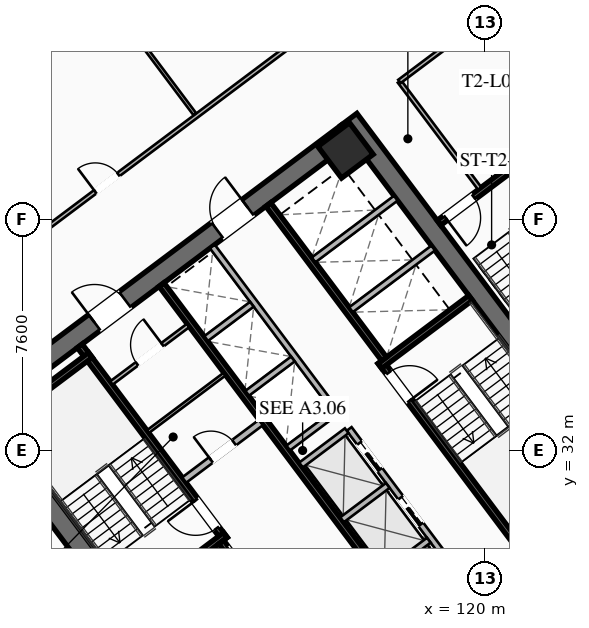
"""IFC4 building model, lengths in metres.
Left out: names, types, materials, properties, quantities, classifications, styles, units other than length and angle.
Written with IfcOpenShell. Run it as: python <this file> out.ifc"""

import sys

from ifc_helpers import new_model, si_unit, direction, frame, frame_2d, origin, origin_2d, place, context, subcontext, project, spatial, rectangle, hollow_rectangle, extrude, element, fill, save


model = new_model("IFC4")
c1 = context("Model", 3, precision=1e-05, world=origin(), true_north=direction((0.0, 1.0)))
c2 = subcontext(c1, "Body", "Model", "MODEL_VIEW")
j1 = project(units=[si_unit("LENGTHUNIT", "METRE"), si_unit("PLANEANGLEUNIT", "RADIAN")], contexts=[c1])
p1 = place(None, origin())
s1 = spatial("IfcSite", under=j1, at=p1, CompositionType="ELEMENT")
p2 = place(p1, origin())
s2 = spatial("IfcBuilding", under=s1, at=p2, CompositionType="ELEMENT")
p3 = place(p2, frame((0.0, 0.0, 28.15)))
s3 = spatial("IfcBuildingStorey", under=s2, at=p3, CompositionType="ELEMENT", Elevation=28.15)
for number, where, z_axis, x_axis in (
    (1, (112.476, 21.107, 0.0), (0.0, 0.0, 1.0), (-0.6, 0.8, 0.0)),
    (2, (115.524, 42.893, 0.0), (0.0, 0.0, 1.0), (0.6, -0.8, 0.0)),
):
    element("IfcWall", number, at=place(p3, frame(where, z_axis=z_axis, x_axis=x_axis)), inside=s3, PredefinedType="SHEAR", context=c2, shape_type="SweptSolid", body=[
        extrude(rectangle(XDim=15.6, YDim=0.65, at=frame_2d((7.8, 0.0))), origin(), (0.0, 0.0, 1.0), 3.55),
    ])
p4 = place(p3, frame((124.429, 30.478, 0.0), z_axis=(0.0, 0.0, 1.0), x_axis=(-0.799998028465, -0.600002628705, 0.0)))
e3 = element("IfcWall", 3, at=p4, inside=s3, PredefinedType="SHEAR", context=c2, shape_type="SweptSolid", body=[
    extrude(rectangle(XDim=14.86, YDim=0.65, at=frame_2d((7.43, 0.0))), origin(), (0.0, 0.0, 1.0), 3.55),
])
p5 = place(p4, frame((9.13, 0.0, 0.0)))
e4 = element("IfcOpeningElement", 4, at=p5, cuts=e3, PredefinedType="OPENING", context=c2, shape_type="SweptSolid", body=[
    extrude(rectangle(XDim=1.25, YDim=2.25, at=frame_2d((0.625, 1.125))), frame((0.0, 0.335, 0.0), z_axis=(0.0, -1.0, 0.0), x_axis=(1.0, 0.0, 0.0)), (0.0, 0.0, 1.0), 0.67),
])
p6 = place(p4, frame((4.08, 0.0, 0.0)))
e5 = element("IfcOpeningElement", 5, at=p6, cuts=e3, PredefinedType="OPENING", context=c2, shape_type="SweptSolid", body=[
    extrude(rectangle(XDim=1.25, YDim=2.25, at=frame_2d((0.625, 1.125))), frame((0.0, 0.335, 0.0), z_axis=(0.0, -1.0, 0.0), x_axis=(1.0, 0.0, 0.0)), (0.0, 0.0, 1.0), 0.67),
])
p7 = place(p3, frame((103.571, 33.522, 0.0), z_axis=(0.0, 0.0, 1.0), x_axis=(0.799998028465, 0.600002628705, 0.0)))
e6 = element("IfcWall", 6, at=p7, inside=s3, PredefinedType="SHEAR", context=c2, shape_type="SweptSolid", body=[
    extrude(rectangle(XDim=14.86, YDim=0.65, at=frame_2d((7.43, 0.0))), origin(), (0.0, 0.0, 1.0), 3.55),
])
p8 = place(p7, frame((4.48, 0.0, 0.0)))
e7 = element("IfcOpeningElement", 7, at=p8, cuts=e6, PredefinedType="OPENING", context=c2, shape_type="SweptSolid", body=[
    extrude(rectangle(XDim=1.25, YDim=2.25, at=frame_2d((0.625, 1.125))), frame((0.0, 0.335, 0.0), z_axis=(0.0, -1.0, 0.0), x_axis=(1.0, 0.0, 0.0)), (0.0, 0.0, 1.0), 0.67),
])
p9 = place(p7, frame((9.53, 0.0, 0.0)))
e8 = element("IfcOpeningElement", 8, at=p9, cuts=e6, PredefinedType="OPENING", context=c2, shape_type="SweptSolid", body=[
    extrude(rectangle(XDim=1.25, YDim=2.25, at=frame_2d((0.625, 1.125))), frame((0.0, 0.335, 0.0), z_axis=(0.0, -1.0, 0.0), x_axis=(1.0, 0.0, 0.0)), (0.0, 0.0, 1.0), 0.67),
])
p10 = place(p3, frame((115.41, 41.87, 0.0), z_axis=(0.0, 0.0, 1.0), x_axis=(0.799999996291, 0.600000004945, 0.0)))
e9 = element("IfcColumn", 9, at=p10, inside=s3, PredefinedType="COLUMN", context=c2, shape_type="SweptSolid", body=[
    extrude(hollow_rectangle(XDim=1.3, YDim=1.3, WallThickness=0.05, at=origin_2d()), origin(), (0.0, 0.0, 1.0), 3.35),
])
p11 = place(p3, frame((111.44, 29.08, 0.0), z_axis=(0.0, 0.0, 1.0), x_axis=(-0.600009827119, 0.799992629566, 0.0)))
e10 = element("IfcWall", 10, at=p11, inside=s3, PredefinedType="SHEAR", context=c2, shape_type="SweptSolid", body=[
    extrude(rectangle(XDim=7.95, YDim=0.2, at=frame_2d((3.975, 0.0))), origin(), (0.0, 0.0, 1.0), 3.35),
])
p12 = place(p11, frame((0.45, 0.0, 0.0)))
e11 = element("IfcOpeningElement", 11, at=p12, cuts=e10, PredefinedType="OPENING", context=c2, shape_type="SweptSolid", body=[
    extrude(rectangle(XDim=1.15, YDim=2.2, at=frame_2d((0.575, 1.1))), frame((0.0, 0.11, 0.0), z_axis=(0.0, -1.0, 0.0), x_axis=(1.0, 0.0, 0.0)), (0.0, 0.0, 1.0), 0.22),
])
for number, where, z_axis, x_axis in (
    (12, (108.476, 26.982, 0.0), (0.0, 0.0, 1.0), (0.8, 0.6, 0.0)),
    (13, (104.036, 32.902, 0.0), (0.0, 0.0, 1.0), (0.8, 0.6, 0.0)),
):
    element("IfcWall", number, at=place(p3, frame(where, z_axis=z_axis, x_axis=x_axis)), inside=s3, PredefinedType="SHEAR", context=c2, shape_type="SweptSolid", body=[
        extrude(rectangle(XDim=3.73, YDim=0.2, at=frame_2d((1.865, 0.0))), origin(), (0.0, 0.0, 1.0), 3.35),
    ])
p13 = place(p3, frame((116.56, 34.92, 0.0), z_axis=(0.0, 0.0, 1.0), x_axis=(0.600009827119, -0.799992629566, 0.0)))
e14 = element("IfcWall", 14, at=p13, inside=s3, PredefinedType="SHEAR", context=c2, shape_type="SweptSolid", body=[
    extrude(rectangle(XDim=7.95, YDim=0.2, at=frame_2d((3.975, 0.0))), origin(), (0.0, 0.0, 1.0), 3.35),
])
p14 = place(p13, frame((0.45, 0.0, 0.0)))
e15 = element("IfcOpeningElement", 15, at=p14, cuts=e14, PredefinedType="OPENING", context=c2, shape_type="SweptSolid", body=[
    extrude(rectangle(XDim=1.15, YDim=2.2, at=frame_2d((0.575, 1.1))), frame((0.0, 0.11, 0.0), z_axis=(0.0, -1.0, 0.0), x_axis=(1.0, 0.0, 0.0)), (0.0, 0.0, 1.0), 0.22),
])
p15 = place(p3, frame((116.54, 34.78, 0.0), z_axis=(0.0, 0.0, 1.0), x_axis=(0.799984290658, 0.600020945218, 0.0)))
e16 = element("IfcWall", 16, at=p15, inside=s3, PredefinedType="SHEAR", context=c2, shape_type="SweptSolid", body=[
    extrude(rectangle(XDim=3.73, YDim=0.2, at=frame_2d((1.865, 0.0))), origin(), (0.0, 0.0, 1.0), 3.35),
])
p16 = place(p3, frame((117.938, 26.016, 0.0), z_axis=(0.0, 0.0, 1.0), x_axis=(-0.600005463273, 0.799995902516, 0.0)))
e17 = element("IfcWall", 17, at=p16, inside=s3, PredefinedType="SHEAR", context=c2, shape_type="SweptSolid", body=[
    extrude(rectangle(XDim=14.3, YDim=0.2, at=frame_2d((7.15, 0.0))), origin(), (0.0, 0.0, 1.0), 3.35),
])
p17 = place(p3, frame((110.104, 31.028, 0.0), z_axis=(0.0, 0.0, 1.0), x_axis=(0.800018601094, 0.59997519774, 0.0)))
e18 = element("IfcWall", 18, at=p17, inside=s3, PredefinedType="SOLIDWALL", context=c2, shape_type="SweptSolid", body=[
    extrude(rectangle(XDim=3.15, YDim=0.22, at=frame_2d((1.575, 0.0))), origin(), (0.0, 0.0, 1.0), 2.703),
])
p18 = place(p17, frame((1.1, 0.0, 0.0)))
e19 = element("IfcOpeningElement", 19, at=p18, cuts=e18, PredefinedType="OPENING", context=c2, shape_type="SweptSolid", body=[
    extrude(rectangle(XDim=0.95, YDim=2.05, at=frame_2d((0.475, 1.025))), frame((0.0, 0.12, 0.0), z_axis=(0.0, -1.0, 0.0), x_axis=(1.0, 0.0, 0.0)), (0.0, 0.0, 1.0), 0.24),
])
p19 = place(p3, frame((115.13, 23.91, 0.0), z_axis=(0.0, 0.0, 1.0), x_axis=(-0.599975393228, 0.800018454488, 0.0)))
e20 = element("IfcWall", 20, at=p19, inside=s3, PredefinedType="SHEAR", context=c2, shape_type="SweptSolid", body=[
    extrude(rectangle(XDim=6.35, YDim=0.2, at=frame_2d((3.175, 0.0))), origin(), (0.0, 0.0, 1.0), 3.35),
])
p20 = place(p19, frame((4.775, 0.0, 0.0)))
e21 = element("IfcOpeningElement", 21, at=p20, cuts=e20, PredefinedType="OPENING", context=c2, shape_type="SweptSolid", body=[
    extrude(rectangle(XDim=1.3, YDim=2.25, at=frame_2d((0.65, 1.125))), frame((0.0, 0.11, 0.0), z_axis=(0.0, -1.0, 0.0), x_axis=(1.0, 0.0, 0.0)), (0.0, 0.0, 1.0), 0.22),
])
p21 = place(p19, frame((2.775, 0.0, 0.0)))
e22 = element("IfcOpeningElement", 22, at=p21, cuts=e20, PredefinedType="OPENING", context=c2, shape_type="SweptSolid", body=[
    extrude(rectangle(XDim=1.3, YDim=2.25, at=frame_2d((0.65, 1.125))), frame((0.0, 0.11, 0.0), z_axis=(0.0, -1.0, 0.0), x_axis=(1.0, 0.0, 0.0)), (0.0, 0.0, 1.0), 0.22),
])
p22 = place(p19, frame((0.575, 0.0, 0.0)))
e23 = element("IfcOpeningElement", 23, at=p22, cuts=e20, PredefinedType="OPENING", context=c2, shape_type="SweptSolid", body=[
    extrude(rectangle(XDim=1.3, YDim=2.25, at=frame_2d((0.65, 1.125))), frame((0.0, 0.11, 0.0), z_axis=(0.0, -1.0, 0.0), x_axis=(1.0, 0.0, 0.0)), (0.0, 0.0, 1.0), 0.22),
])
p23 = place(p3, frame((112.87, 40.09, 0.0), z_axis=(0.0, 0.0, 1.0), x_axis=(0.599975393228, -0.800018454488, 0.0)))
e24 = element("IfcWall", 24, at=p23, inside=s3, PredefinedType="SHEAR", context=c2, shape_type="SweptSolid", body=[
    extrude(rectangle(XDim=6.35, YDim=0.2, at=frame_2d((3.175, 0.0))), origin(), (0.0, 0.0, 1.0), 3.35),
])
for number, where, z_axis, x_axis in (
    (25, (115.59, 36.63, 0.0), (0.0, 0.0, 1.0), (0.8, 0.6, 0.0)),
    (26, (114.36, 38.27, 0.0), (0.0, 0.0, 1.0), (0.8, 0.6, 0.0)),
):
    element("IfcWall", number, at=place(p3, frame(where, z_axis=z_axis, x_axis=x_axis)), inside=s3, PredefinedType="SOLIDWALL", context=c2, shape_type="SweptSolid", body=[
        extrude(rectangle(XDim=3.38, YDim=0.2, at=frame_2d((1.69, 0.0))), origin(), (0.0, 0.0, 1.0), 3.35),
    ])
p24 = place(p3, frame((107.71, 34.22, 0.0), z_axis=(0.0, 0.0, 1.0), x_axis=(0.799981399002, 0.60002480053, 0.0)))
e27 = element("IfcWall", 27, at=p24, inside=s3, PredefinedType="PARTITIONING", context=c2, shape_type="SweptSolid", body=[
    extrude(rectangle(XDim=3.15, YDim=0.135, at=frame_2d((1.575, 0.0))), origin(), (0.0, 0.0, 1.0), 2.703),
])
p25 = place(p24, frame((1.05, 0.0, 0.0)))
e28 = element("IfcOpeningElement", 28, at=p25, cuts=e27, PredefinedType="OPENING", context=c2, shape_type="SweptSolid", body=[
    extrude(rectangle(XDim=1.05, YDim=2.2, at=frame_2d((0.525, 1.1))), frame((0.0, 0.077, 0.0), z_axis=(0.0, -1.0, 0.0), x_axis=(1.0, 0.0, 0.0)), (0.0, 0.0, 1.0), 0.155),
])
p26 = place(p3, frame((108.91, 32.62, 0.0), z_axis=(0.0, 0.0, 1.0), x_axis=(0.800018601094, 0.59997519774, 0.0)))
e29 = element("IfcWall", 29, at=p26, inside=s3, PredefinedType="PARTITIONING", context=c2, shape_type="SweptSolid", body=[
    extrude(rectangle(XDim=3.15, YDim=0.11, at=frame_2d((1.575, 0.0))), origin(), (0.0, 0.0, 1.0), 2.703),
])
p27 = place(p3, frame((119.61, 27.27, 0.0), z_axis=(0.0, 0.0, 1.0), x_axis=(-0.600011488909, 0.79999138319, 0.0)))
e30 = element("IfcWall", 30, at=p27, inside=s3, PredefinedType="SOLIDWALL", context=c2, shape_type="SweptSolid", body=[
    extrude(rectangle(XDim=6.8, YDim=0.2, at=frame_2d((3.4, 0.0))), origin(), (0.0, 0.0, 1.0), 3.35),
])
p28 = place(p27, frame((0.625, 0.0, 0.0)))
e31 = element("IfcOpeningElement", 31, at=p28, cuts=e30, PredefinedType="OPENING", context=c2, shape_type="SweptSolid", body=[
    extrude(rectangle(XDim=1.1, YDim=2.2, at=frame_2d((0.55, 1.1))), frame((0.0, 0.11, 0.0), z_axis=(0.0, -1.0, 0.0), x_axis=(1.0, 0.0, 0.0)), (0.0, 0.0, 1.0), 0.22),
])
p29 = place(p27, frame((2.875, 0.0, 0.0)))
e32 = element("IfcOpeningElement", 32, at=p29, cuts=e30, PredefinedType="OPENING", context=c2, shape_type="SweptSolid", body=[
    extrude(rectangle(XDim=1.1, YDim=2.2, at=frame_2d((0.55, 1.1))), frame((0.0, 0.11, 0.0), z_axis=(0.0, -1.0, 0.0), x_axis=(1.0, 0.0, 0.0)), (0.0, 0.0, 1.0), 0.22),
])
p30 = place(p27, frame((5.125, 0.0, 0.0)))
e33 = element("IfcOpeningElement", 33, at=p30, cuts=e30, PredefinedType="OPENING", context=c2, shape_type="SweptSolid", body=[
    extrude(rectangle(XDim=1.1, YDim=2.2, at=frame_2d((0.55, 1.1))), frame((0.0, 0.11, 0.0), z_axis=(0.0, -1.0, 0.0), x_axis=(1.0, 0.0, 0.0)), (0.0, 0.0, 1.0), 0.22),
])
p31 = place(p3, frame((116.646, 27.922, 0.0), z_axis=(0.0, 0.0, 1.0), x_axis=(0.8, 0.6, 0.0)))
e34 = element("IfcWall", 34, at=p31, inside=s3, PredefinedType="SOLIDWALL", context=c2, shape_type="SweptSolid", body=[
    extrude(rectangle(XDim=1.88, YDim=0.2, at=frame_2d((0.94, 0.0))), origin(), (0.0, 0.0, 1.0), 3.35),
])
p32 = place(p3, frame((115.296, 29.722, 0.0), z_axis=(0.0, 0.0, 1.0), x_axis=(0.799984418148, 0.600020775241, 0.0)))
e35 = element("IfcWall", 35, at=p32, inside=s3, PredefinedType="SOLIDWALL", context=c2, shape_type="SweptSolid", body=[
    extrude(rectangle(XDim=1.88, YDim=0.2, at=frame_2d((0.94, 0.0))), origin(), (0.0, 0.0, 1.0), 3.35),
])
p33 = place(p3, frame((113.946, 31.522, 0.0), z_axis=(0.0, 0.0, 1.0), x_axis=(0.8, 0.6, 0.0)))
e36 = element("IfcWall", 36, at=p33, inside=s3, PredefinedType="SOLIDWALL", context=c2, shape_type="SweptSolid", body=[
    extrude(rectangle(XDim=1.88, YDim=0.2, at=frame_2d((0.94, 0.0))), origin(), (0.0, 0.0, 1.0), 3.35),
])
p34 = place(p3, frame((115.11, 33.27, 0.0), z_axis=(0.0, 0.0, 1.0), x_axis=(-0.600011488909, 0.79999138319, 0.0)))
e37 = element("IfcWall", 37, at=p34, inside=s3, PredefinedType="SOLIDWALL", context=c2, shape_type="SweptSolid", body=[
    extrude(rectangle(XDim=6.8, YDim=0.2, at=frame_2d((3.4, 0.0))), origin(), (0.0, 0.0, 1.0), 3.35),
])
p35 = place(p3, frame((113.526, 32.082, 0.0), z_axis=(0.0, 0.0, 1.0), x_axis=(0.800046745961, 0.599937666993, 0.0)))
e38 = element("IfcWall", 38, at=p35, inside=s3, PredefinedType="SOLIDWALL", context=c2, shape_type="SweptSolid", body=[
    extrude(rectangle(XDim=1.88, YDim=0.2, at=frame_2d((0.94, 0.0))), origin(), (0.0, 0.0, 1.0), 3.35),
])
p36 = place(p3, frame((112.176, 33.882, 0.0), z_axis=(0.0, 0.0, 1.0), x_axis=(0.8, 0.6, 0.0)))
e39 = element("IfcWall", 39, at=p36, inside=s3, PredefinedType="SOLIDWALL", context=c2, shape_type="SweptSolid", body=[
    extrude(rectangle(XDim=1.88, YDim=0.2, at=frame_2d((0.94, 0.0))), origin(), (0.0, 0.0, 1.0), 3.35),
])
p37 = place(p3, frame((110.826, 35.682, 0.0), z_axis=(0.0, 0.0, 1.0), x_axis=(0.799984418148, 0.600020775241, 0.0)))
e40 = element("IfcWall", 40, at=p37, inside=s3, PredefinedType="SOLIDWALL", context=c2, shape_type="SweptSolid", body=[
    extrude(rectangle(XDim=1.88, YDim=0.2, at=frame_2d((0.94, 0.0))), origin(), (0.0, 0.0, 1.0), 3.35),
])
p38 = place(p3, frame((121.204, 41.528, 0.0), z_axis=(0.0, 0.0, 1.0), x_axis=(-0.800017232136, -0.599977023131, 0.0)))
e41 = element("IfcWall", 41, at=p38, inside=s3, PredefinedType="SHEAR", context=c2, shape_type="SweptSolid", body=[
    extrude(rectangle(XDim=3.4, YDim=0.2, at=frame_2d((1.7, 0.0))), origin(), (0.0, 0.0, 1.0), 3.35),
])
p39 = place(p38, frame((1.975, 0.0, 0.0)))
e42 = element("IfcOpeningElement", 42, at=p39, cuts=e41, PredefinedType="OPENING", context=c2, shape_type="SweptSolid", body=[
    extrude(rectangle(XDim=1.15, YDim=2.2, at=frame_2d((0.575, 1.1))), frame((0.0, 0.11, 0.0), z_axis=(0.0, -1.0, 0.0), x_axis=(1.0, 0.0, 0.0)), (0.0, 0.0, 1.0), 0.22),
])
p40 = place(p3, frame((119.824, 40.618, 0.0), z_axis=(0.0, 0.0, 1.0), x_axis=(-0.599982243973, 0.800013316712, 0.0)))
e43 = element("IfcWall", 43, at=p40, inside=s3, PredefinedType="PARTITIONING", context=c2, shape_type="SweptSolid", body=[
    extrude(rectangle(XDim=4.4, YDim=0.135, at=frame_2d((2.2, 0.0))), origin(), (0.0, 0.0, 1.0), 2.703),
])
p41 = place(p3, frame((98.516, 34.012, 0.0), z_axis=(0.0, 0.0, 1.0), x_axis=(0.799998035726, 0.600002619023, 0.0)))
e44 = element("IfcWall", 44, at=p41, inside=s3, PredefinedType="PARTITIONING", context=c2, shape_type="SweptSolid", body=[
    extrude(rectangle(XDim=29.83, YDim=0.135, at=frame_2d((14.915, 0.0))), origin(), (0.0, 0.0, 1.0), 2.703),
])
p42 = place(p41, frame((0.3, 0.0, 0.0)))
e45 = element("IfcOpeningElement", 45, at=p42, cuts=e44, PredefinedType="OPENING", context=c2, shape_type="SweptSolid", body=[
    extrude(rectangle(XDim=0.95, YDim=2.05, at=frame_2d((0.475, 1.025))), frame((0.0, 0.077, 0.0), z_axis=(0.0, -1.0, 0.0), x_axis=(1.0, 0.0, 0.0)), (0.0, 0.0, 1.0), 0.155),
])
p43 = place(p41, frame((10.829, 0.0, 0.0)))
e46 = element("IfcOpeningElement", 46, at=p43, cuts=e44, PredefinedType="OPENING", context=c2, shape_type="SweptSolid", body=[
    extrude(rectangle(XDim=0.95, YDim=2.05, at=frame_2d((0.475, 1.025))), frame((0.0, 0.077, 0.0), z_axis=(0.0, -1.0, 0.0), x_axis=(1.0, 0.0, 0.0)), (0.0, 0.0, 1.0), 0.155),
])
p44 = place(p41, frame((28.58, 0.0, 0.0)))
e47 = element("IfcOpeningElement", 47, at=p44, cuts=e44, PredefinedType="OPENING", context=c2, shape_type="SweptSolid", body=[
    extrude(rectangle(XDim=0.95, YDim=2.05, at=frame_2d((0.475, 1.025))), frame((0.0, 0.077, 0.0), z_axis=(0.0, -1.0, 0.0), x_axis=(1.0, 0.0, 0.0)), (0.0, 0.0, 1.0), 0.155),
])
p45 = place(p3, frame((110.452, 43.064, 0.0), z_axis=(0.0, 0.0, 1.0), x_axis=(-0.599992698573, 0.800005476018, 0.0)))
e48 = element("IfcWall", 48, at=p45, inside=s3, PredefinedType="PARTITIONING", context=c2, shape_type="SweptSolid", body=[
    extrude(rectangle(XDim=10.7, YDim=0.11, at=frame_2d((5.35, 0.0))), origin(), (0.0, 0.0, 1.0), 2.703),
])
p46 = place(p3, frame((135.46, 34.47, 0.0), z_axis=(0.0, 0.0, 1.0), x_axis=(-0.800000982127, -0.599998690494, 0.0)))
e49 = element("IfcWall", 49, at=p46, inside=s3, PredefinedType="PARTITIONING", context=c2, shape_type="SweptSolid", body=[
    extrude(rectangle(XDim=29.83, YDim=0.135, at=frame_2d((14.915, 0.0))), origin(), (0.0, 0.0, 1.0), 2.703),
])
p47 = place(p46, frame((28.5, 0.0, 0.0)))
e50 = element("IfcOpeningElement", 50, at=p47, cuts=e49, PredefinedType="OPENING", context=c2, shape_type="SweptSolid", body=[
    extrude(rectangle(XDim=0.95, YDim=2.05, at=frame_2d((0.475, 1.025))), frame((0.0, 0.077, 0.0), z_axis=(0.0, -1.0, 0.0), x_axis=(1.0, 0.0, 0.0)), (0.0, 0.0, 1.0), 0.155),
])
p48 = place(p46, frame((18.075, 0.0, 0.0)))
e51 = element("IfcOpeningElement", 51, at=p48, cuts=e49, PredefinedType="OPENING", context=c2, shape_type="SweptSolid", body=[
    extrude(rectangle(XDim=0.95, YDim=2.05, at=frame_2d((0.475, 1.025))), frame((0.0, 0.077, 0.0), z_axis=(0.0, -1.0, 0.0), x_axis=(1.0, 0.0, 0.0)), (0.0, 0.0, 1.0), 0.155),
])
p49 = place(p46, frame((0.38, 0.0, 0.0)))
e52 = element("IfcOpeningElement", 52, at=p49, cuts=e49, PredefinedType="OPENING", context=c2, shape_type="SweptSolid", body=[
    extrude(rectangle(XDim=0.95, YDim=2.05, at=frame_2d((0.475, 1.025))), frame((0.0, 0.077, 0.0), z_axis=(0.0, -1.0, 0.0), x_axis=(1.0, 0.0, 0.0)), (0.0, 0.0, 1.0), 0.155),
])
p50 = place(p3, frame((126.664, 51.248, 0.0), z_axis=(0.0, 0.0, 1.0), x_axis=(-0.799995055373, -0.600006592779, 0.0)))
e53 = element("IfcWall", 53, at=p50, inside=s3, PredefinedType="PARTITIONING", context=c2, shape_type="SweptSolid", body=[
    extrude(rectangle(XDim=11.85, YDim=0.135, at=frame_2d((5.925, 0.0))), origin(), (0.0, 0.0, 1.0), 2.703),
])
p51 = place(p50, frame((5.8, 0.0, 0.0)))
e54 = element("IfcOpeningElement", 54, at=p51, cuts=e53, PredefinedType="OPENING", context=c2, shape_type="SweptSolid", body=[
    extrude(rectangle(XDim=0.95, YDim=2.05, at=frame_2d((0.475, 1.025))), frame((0.0, 0.077, 0.0), z_axis=(0.0, -1.0, 0.0), x_axis=(1.0, 0.0, 0.0)), (0.0, 0.0, 1.0), 0.155),
])
p52 = place(p3, frame((111.548, 16.636, 0.0), z_axis=(0.0, 0.0, 1.0), x_axis=(-0.600003610192, 0.799997292343, 0.0)))
e55 = element("IfcWall", 55, at=p52, inside=s3, PredefinedType="PARTITIONING", context=c2, shape_type="SweptSolid", body=[
    extrude(rectangle(XDim=21.64, YDim=0.135, at=frame_2d((10.82, 0.0))), origin(), (0.0, 0.0, 1.0), 2.703),
])
p53 = place(p52, frame((0.3, 0.0, 0.0)))
e56 = element("IfcOpeningElement", 56, at=p53, cuts=e55, PredefinedType="OPENING", context=c2, shape_type="SweptSolid", body=[
    extrude(rectangle(XDim=0.95, YDim=2.05, at=frame_2d((0.475, 1.025))), frame((0.0, 0.077, 0.0), z_axis=(0.0, -1.0, 0.0), x_axis=(1.0, 0.0, 0.0)), (0.0, 0.0, 1.0), 0.155),
])
p54 = place(p8, origin())
e57 = element("IfcDoor", 57, at=p54, inside=s3, OperationType="SINGLE_SWING_LEFT", PredefinedType="DOOR", context=c2, shape_type="SweptSolid", body=[
    extrude(rectangle(XDim=1.25, YDim=2.25, at=frame_2d((0.625, 1.125))), frame((0.0, 0.025, 0.0), z_axis=(0.0, -1.0, 0.0), x_axis=(1.0, 0.0, 0.0)), (0.0, 0.0, 1.0), 0.05),
])
fill(e7, e57)
p55 = place(p9, origin())
e58 = element("IfcDoor", 58, at=p55, inside=s3, OperationType="SINGLE_SWING_RIGHT", PredefinedType="DOOR", context=c2, shape_type="SweptSolid", body=[
    extrude(rectangle(XDim=1.25, YDim=2.25, at=frame_2d((0.625, 1.125))), frame((0.0, 0.025, 0.0), z_axis=(0.0, -1.0, 0.0), x_axis=(1.0, 0.0, 0.0)), (0.0, 0.0, 1.0), 0.05),
])
fill(e8, e58)
p56 = place(p12, origin())
e59 = element("IfcDoor", 59, at=p56, inside=s3, OperationType="SINGLE_SWING_RIGHT", PredefinedType="DOOR", context=c2, shape_type="SweptSolid", body=[
    extrude(rectangle(XDim=1.15, YDim=2.2, at=frame_2d((0.575, 1.1))), frame((0.0, 0.025, 0.0), z_axis=(0.0, -1.0, 0.0), x_axis=(1.0, 0.0, 0.0)), (0.0, 0.0, 1.0), 0.05),
])
fill(e11, e59)
p57 = place(p14, origin())
e60 = element("IfcDoor", 60, at=p57, inside=s3, OperationType="SINGLE_SWING_RIGHT", PredefinedType="DOOR", context=c2, shape_type="SweptSolid", body=[
    extrude(rectangle(XDim=1.15, YDim=2.2, at=frame_2d((0.575, 1.1))), frame((0.0, 0.025, 0.0), z_axis=(0.0, -1.0, 0.0), x_axis=(1.0, 0.0, 0.0)), (0.0, 0.0, 1.0), 0.05),
])
fill(e15, e60)
p58 = place(p25, origin())
e61 = element("IfcDoor", 61, at=p58, inside=s3, OperationType="SINGLE_SWING_RIGHT", PredefinedType="DOOR", context=c2, shape_type="SweptSolid", body=[
    extrude(rectangle(XDim=1.05, YDim=2.2, at=frame_2d((0.525, 1.1))), frame((0.0, 0.025, 0.0), z_axis=(0.0, -1.0, 0.0), x_axis=(1.0, 0.0, 0.0)), (0.0, 0.0, 1.0), 0.05),
])
fill(e28, e61)
p59 = place(p18, origin())
e62 = element("IfcDoor", 62, at=p59, inside=s3, OperationType="SINGLE_SWING_LEFT", PredefinedType="DOOR", context=c2, shape_type="SweptSolid", body=[
    extrude(rectangle(XDim=0.95, YDim=2.05, at=frame_2d((0.475, 1.025))), frame((0.0, 0.025, 0.0), z_axis=(0.0, -1.0, 0.0), x_axis=(1.0, 0.0, 0.0)), (0.0, 0.0, 1.0), 0.05),
])
fill(e19, e62)
p60 = place(p39, origin())
e63 = element("IfcDoor", 63, at=p60, inside=s3, OperationType="SINGLE_SWING_RIGHT", PredefinedType="DOOR", context=c2, shape_type="SweptSolid", body=[
    extrude(rectangle(XDim=1.15, YDim=2.2, at=frame_2d((0.575, 1.1))), frame((0.0, 0.025, 0.0), z_axis=(0.0, -1.0, 0.0), x_axis=(1.0, 0.0, 0.0)), (0.0, 0.0, 1.0), 0.05),
])
fill(e42, e63)
p61 = place(p43, origin())
e64 = element("IfcDoor", 64, at=p61, inside=s3, OperationType="SINGLE_SWING_LEFT", PredefinedType="DOOR", context=c2, shape_type="SweptSolid", body=[
    extrude(rectangle(XDim=0.95, YDim=2.05, at=frame_2d((0.475, 1.025))), frame((0.0, 0.025, 0.0), z_axis=(0.0, -1.0, 0.0), x_axis=(1.0, 0.0, 0.0)), (0.0, 0.0, 1.0), 0.05),
])
fill(e46, e64)
p62 = place(p29, origin())
e65 = element("IfcDoor", 65, at=p62, inside=s3, OperationType="SLIDING_TO_LEFT", PredefinedType="DOOR", context=c2, shape_type="SweptSolid", body=[
    extrude(rectangle(XDim=1.1, YDim=2.2, at=frame_2d((0.55, 1.1))), frame((0.0, 0.025, 0.0), z_axis=(0.0, -1.0, 0.0), x_axis=(1.0, 0.0, 0.0)), (0.0, 0.0, 1.0), 0.05),
])
fill(e32, e65)
p63 = place(p30, origin())
e66 = element("IfcDoor", 66, at=p63, inside=s3, OperationType="SLIDING_TO_LEFT", PredefinedType="DOOR", context=c2, shape_type="SweptSolid", body=[
    extrude(rectangle(XDim=1.1, YDim=2.2, at=frame_2d((0.55, 1.1))), frame((0.0, 0.025, 0.0), z_axis=(0.0, -1.0, 0.0), x_axis=(1.0, 0.0, 0.0)), (0.0, 0.0, 1.0), 0.05),
])
fill(e33, e66)
save(model, sys.argv[1])
